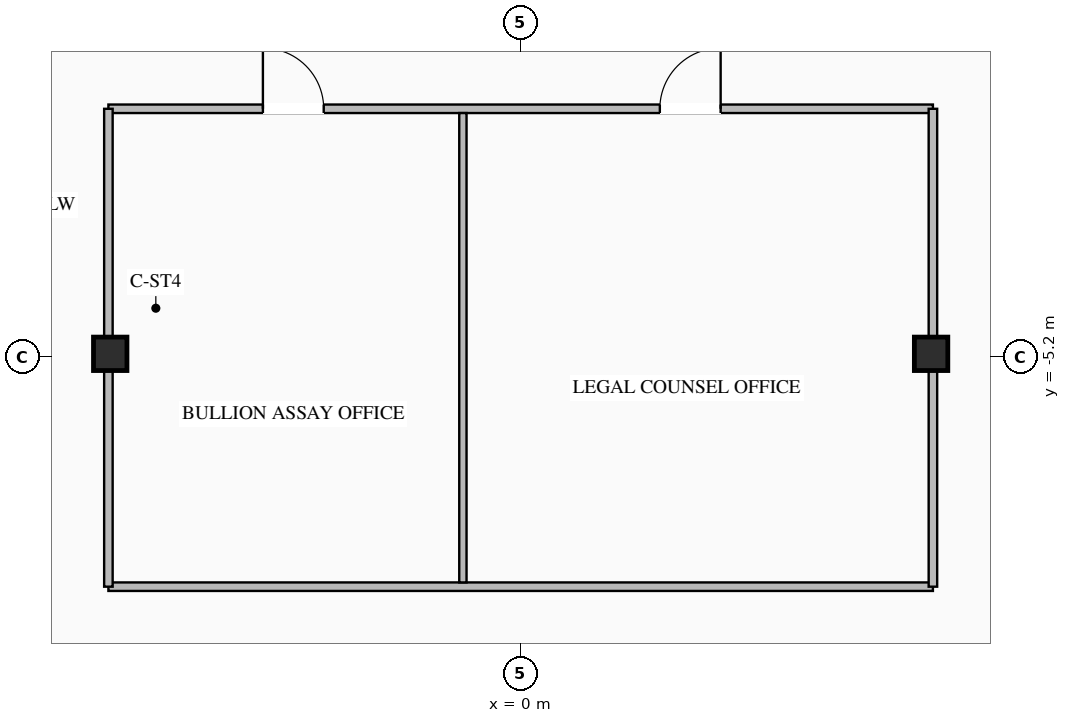
"""IFC4 building model, lengths in metres.
Left out: names, types, materials, properties, quantities, classifications, styles, units other than length and angle.
Written with IfcOpenShell. Run it as: python <this file> out.ifc"""

import sys

from ifc_helpers import new_model, si_unit, direction, frame, frame_2d, origin, origin_2d, place, context, subcontext, project, spatial, rectangle, i_section, extrude, element, fill, save


model = new_model("IFC4")
c1 = context("Model", 3, precision=1e-05, world=origin(), true_north=direction((0.0, 1.0)))
c2 = subcontext(c1, "Body", "Model", "MODEL_VIEW")
j1 = project(units=[si_unit("LENGTHUNIT", "METRE"), si_unit("PLANEANGLEUNIT", "RADIAN")], contexts=[c1])
p1 = place(None, origin())
s1 = spatial("IfcSite", under=j1, at=p1, CompositionType="ELEMENT")
p2 = place(p1, origin())
s2 = spatial("IfcBuilding", under=s1, at=p2, CompositionType="ELEMENT")
p3 = place(p2, frame((0.0, 0.0, 218.85)))
s3 = spatial("IfcBuildingStorey", under=s2, at=p3, CompositionType="ELEMENT", Elevation=218.85)
for number, where, z_axis, x_axis in (
    (1, (-6.75, -5.15, 0.0), (0.0, 0.0, 1.0), (1.0, 0.0, 0.0)),
    (2, (6.75, -5.15, 0.0), (0.0, 0.0, 1.0), (1.0, 0.0, 0.0)),
):
    element("IfcColumn", number, at=place(p3, frame(where, z_axis=z_axis, x_axis=x_axis)), inside=s3, PredefinedType="COLUMN", context=c2, shape_type="SweptSolid", body=[
        extrude(i_section(OverallWidth=0.55, OverallDepth=0.55, WebThickness=0.024, FlangeThickness=0.036, at=origin_2d()), origin(), (0.0, 0.0, 1.0), 3.45),
    ])
p4 = place(p3, frame((-6.78, -1.12, 0.0), z_axis=(0.0, 0.0, 1.0), x_axis=(1.0, 0.0, 0.0)))
e3 = element("IfcWall", 3, at=p4, inside=s3, PredefinedType="STANDARD", context=c2, shape_type="SweptSolid", body=[
    extrude(rectangle(XDim=13.56, YDim=0.14, at=frame_2d((6.78, 0.0))), origin(), (0.0, 0.0, 1.0), 3.25),
])
p5 = place(p4, frame((2.541, 0.0, 0.0)))
e4 = element("IfcOpeningElement", 4, at=p5, cuts=e3, PredefinedType="OPENING", context=c2, shape_type="SweptSolid", body=[
    extrude(rectangle(XDim=1.0, YDim=2.08, at=frame_2d((0.5, 1.04))), frame((0.0, 0.08, 0.0), z_axis=(0.0, -1.0, 0.0), x_axis=(1.0, 0.0, 0.0)), (0.0, 0.0, 1.0), 0.16),
])
p6 = place(p4, frame((9.069, 0.0, 0.0)))
e5 = element("IfcOpeningElement", 5, at=p6, cuts=e3, PredefinedType="OPENING", context=c2, shape_type="SweptSolid", body=[
    extrude(rectangle(XDim=1.0, YDim=2.08, at=frame_2d((0.5, 1.04))), frame((0.0, 0.08, 0.0), z_axis=(0.0, -1.0, 0.0), x_axis=(1.0, 0.0, 0.0)), (0.0, 0.0, 1.0), 0.16),
])
p7 = place(p3, frame((-6.78, -8.98, 0.0), z_axis=(0.0, 0.0, 1.0), x_axis=(1.0, 0.0, 0.0)))
e6 = element("IfcWall", 6, at=p7, inside=s3, PredefinedType="STANDARD", context=c2, shape_type="SweptSolid", body=[
    extrude(rectangle(XDim=13.56, YDim=0.14, at=frame_2d((6.78, 0.0))), origin(), (0.0, 0.0, 1.0), 3.25),
])
for number, where, z_axis, x_axis in (
    (7, (-6.78, -8.98, 0.0), (0.0, 0.0, 1.0), (0.0, 1.0, 0.0)),
    (8, (6.78, -8.98, 0.0), (0.0, 0.0, 1.0), (0.0, 1.0, 0.0)),
):
    element("IfcWall", number, at=place(p3, frame(where, z_axis=z_axis, x_axis=x_axis)), inside=s3, PredefinedType="STANDARD", context=c2, shape_type="SweptSolid", body=[
        extrude(rectangle(XDim=7.86, YDim=0.14, at=frame_2d((3.93, 0.0))), origin(), (0.0, 0.0, 1.0), 2.645),
    ])
p8 = place(p3, frame((-0.95, -8.91, 0.0), z_axis=(0.0, 0.0, 1.0), x_axis=(0.0, 1.0, 0.0)))
e9 = element("IfcWall", 9, at=p8, inside=s3, PredefinedType="STANDARD", context=c2, shape_type="SweptSolid", body=[
    extrude(rectangle(XDim=7.72, YDim=0.12, at=frame_2d((3.86, 0.0))), origin(), (0.0, 0.0, 1.0), 3.25),
])
p9 = place(p5, origin())
e10 = element("IfcDoor", 10, at=p9, inside=s3, OperationType="SINGLE_SWING_LEFT", PredefinedType="DOOR", context=c2, shape_type="SweptSolid", body=[
    extrude(rectangle(XDim=1.0, YDim=2.08, at=frame_2d((0.5, 1.04))), frame((0.0, 0.025, 0.0), z_axis=(0.0, -1.0, 0.0), x_axis=(1.0, 0.0, 0.0)), (0.0, 0.0, 1.0), 0.05),
])
fill(e4, e10)
p10 = place(p6, origin())
e11 = element("IfcDoor", 11, at=p10, inside=s3, OperationType="SINGLE_SWING_RIGHT", PredefinedType="DOOR", context=c2, shape_type="SweptSolid", body=[
    extrude(rectangle(XDim=1.0, YDim=2.08, at=frame_2d((0.5, 1.04))), frame((0.0, 0.025, 0.0), z_axis=(0.0, -1.0, 0.0), x_axis=(1.0, 0.0, 0.0)), (0.0, 0.0, 1.0), 0.05),
])
fill(e5, e11)
save(model, sys.argv[1])
